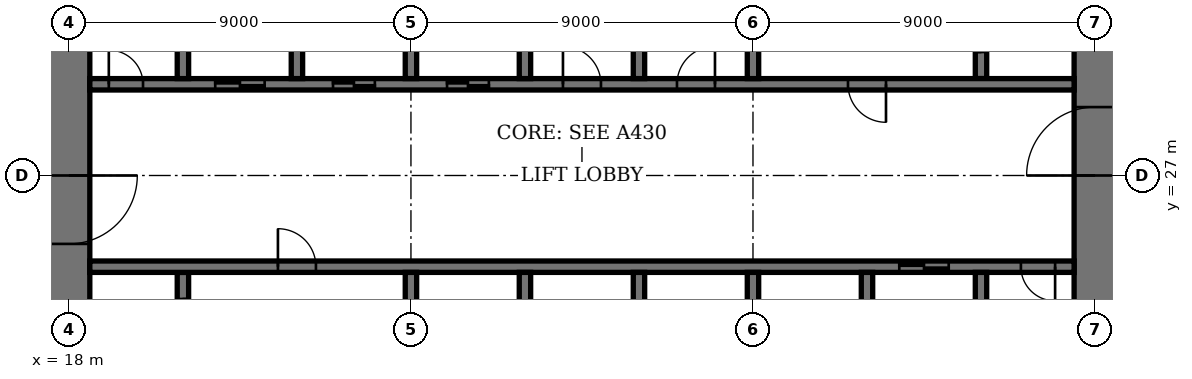
"""IFC4 building model, lengths in metres.
Left out: names, types, materials, properties, quantities, classifications, styles, units other than length and angle.
Written with IfcOpenShell. Run it as: python <this file> out.ifc"""

import sys

from ifc_helpers import new_model, si_unit, direction, frame, frame_2d, origin, place, context, subcontext, project, spatial, rectangle, extrude, element, fill, save


model = new_model("IFC4")
c1 = context("Model", 3, precision=1e-05, world=origin(), true_north=direction((0.0, 1.0)))
c2 = subcontext(c1, "Body", "Model", "MODEL_VIEW")
j1 = project(units=[si_unit("LENGTHUNIT", "METRE"), si_unit("PLANEANGLEUNIT", "RADIAN")], contexts=[c1])
p1 = place(None, origin())
s1 = spatial("IfcSite", under=j1, at=p1, CompositionType="ELEMENT")
p2 = place(p1, origin())
s2 = spatial("IfcBuilding", under=s1, at=p2, CompositionType="ELEMENT")
p3 = place(p2, frame((0.0, 0.0, 202.2)))
s3 = spatial("IfcBuildingStorey", under=s2, at=p3, CompositionType="ELEMENT", Elevation=202.2)
p4 = place(p3, frame((18.0, 35.45, 0.0), z_axis=(0.0, 0.0, 1.0), x_axis=(0.0, -1.0, 0.0)))
e1 = element("IfcWall", 1, at=p4, inside=s3, PredefinedType="SHEAR", context=c2, shape_type="SweptSolid", body=[
    extrude(rectangle(XDim=16.9, YDim=1.1, at=frame_2d((8.45, 0.0))), origin(), (0.0, 0.0, 1.0), 4.0),
])
p5 = place(p4, frame((8.45, 0.0, 0.0)))
e2 = element("IfcOpeningElement", 2, at=p5, cuts=e1, PredefinedType="OPENING", context=c2, shape_type="SweptSolid", body=[
    extrude(rectangle(XDim=1.8, YDim=2.4, at=frame_2d((0.9, 1.2))), frame((0.0, 0.56, 0.0), z_axis=(0.0, -1.0, 0.0), x_axis=(1.0, 0.0, 0.0)), (0.0, 0.0, 1.0), 1.12),
])
p6 = place(p3, frame((45.0, 18.55, 0.0), z_axis=(0.0, 0.0, 1.0), x_axis=(0.0, 1.0, 0.0)))
e3 = element("IfcWall", 3, at=p6, inside=s3, PredefinedType="SHEAR", context=c2, shape_type="SweptSolid", body=[
    extrude(rectangle(XDim=16.9, YDim=1.1, at=frame_2d((8.45, 0.0))), origin(), (0.0, 0.0, 1.0), 4.0),
])
p7 = place(p6, frame((8.45, 0.0, 0.0)))
e4 = element("IfcOpeningElement", 4, at=p7, cuts=e3, PredefinedType="OPENING", context=c2, shape_type="SweptSolid", body=[
    extrude(rectangle(XDim=1.8, YDim=2.4, at=frame_2d((0.9, 1.2))), frame((0.0, 0.56, 0.0), z_axis=(0.0, -1.0, 0.0), x_axis=(1.0, 0.0, 0.0)), (0.0, 0.0, 1.0), 1.12),
])
p8 = place(p3, frame((21.0, 21.95, 0.0), z_axis=(0.0, 0.0, 1.0), x_axis=(0.0, 1.0, 0.0)))
e5 = element("IfcWall", 5, at=p8, inside=s3, PredefinedType="SHEAR", context=c2, shape_type="SweptSolid", body=[
    extrude(rectangle(XDim=2.5, YDim=0.3, at=frame_2d((1.25, 0.0))), origin(), (0.0, 0.0, 1.0), 4.0),
])
p9 = place(p8, frame((0.7, 0.0, 0.0)))
e6 = element("IfcOpeningElement", 6, at=p9, cuts=e5, PredefinedType="OPENING", context=c2, shape_type="SweptSolid", body=[
    extrude(rectangle(XDim=1.1, YDim=2.4, at=frame_2d((0.55, 1.2))), frame((0.0, 0.16, 0.0), z_axis=(0.0, -1.0, 0.0), x_axis=(1.0, 0.0, 0.0)), (0.0, 0.0, 1.0), 0.32),
])
p10 = place(p3, frame((42.0, 29.55, 0.0), z_axis=(0.0, 0.0, 1.0), x_axis=(0.0, 1.0, 0.0)))
e7 = element("IfcWall", 7, at=p10, inside=s3, PredefinedType="SHEAR", context=c2, shape_type="SweptSolid", body=[
    extrude(rectangle(XDim=2.5, YDim=0.3, at=frame_2d((1.25, 0.0))), origin(), (0.0, 0.0, 1.0), 4.0),
])
p11 = place(p10, frame((0.7, 0.0, 0.0)))
e8 = element("IfcOpeningElement", 8, at=p11, cuts=e7, PredefinedType="OPENING", context=c2, shape_type="SweptSolid", body=[
    extrude(rectangle(XDim=1.1, YDim=2.4, at=frame_2d((0.55, 1.2))), frame((0.0, 0.16, 0.0), z_axis=(0.0, -1.0, 0.0), x_axis=(1.0, 0.0, 0.0)), (0.0, 0.0, 1.0), 0.32),
])
p12 = place(p3, frame((18.55, 24.6, 0.0), z_axis=(0.0, 0.0, 1.0), x_axis=(1.0, 0.0, 0.0)))
e9 = element("IfcWall", 9, at=p12, inside=s3, PredefinedType="SHEAR", context=c2, shape_type="SweptSolid", body=[
    extrude(rectangle(XDim=25.9, YDim=0.3, at=frame_2d((12.95, 0.0))), origin(), (0.0, 0.0, 1.0), 4.0),
])
p13 = place(p12, frame((4.95, 0.0, 0.0)))
e10 = element("IfcOpeningElement", 10, at=p13, cuts=e9, PredefinedType="OPENING", context=c2, shape_type="SweptSolid", body=[
    extrude(rectangle(XDim=1.0, YDim=2.4, at=frame_2d((0.5, 1.2))), frame((0.0, 0.16, 0.0), z_axis=(0.0, -1.0, 0.0), x_axis=(1.0, 0.0, 0.0)), (0.0, 0.0, 1.0), 0.32),
])
p14 = place(p12, frame((24.5, 0.0, 0.0)))
e11 = element("IfcOpeningElement", 11, at=p14, cuts=e9, PredefinedType="OPENING", context=c2, shape_type="SweptSolid", body=[
    extrude(rectangle(XDim=0.9, YDim=2.1, at=frame_2d((0.45, 1.05))), frame((0.0, 0.16, 0.0), z_axis=(0.0, -1.0, 0.0), x_axis=(1.0, 0.0, 0.0)), (0.0, 0.0, 1.0), 0.32),
])
p15 = place(p12, frame((21.3, 0.0, 0.0)))
e12 = element("IfcOpeningElement", 12, at=p15, cuts=e9, PredefinedType="OPENING", context=c2, shape_type="SweptSolid", body=[
    extrude(rectangle(XDim=1.3, YDim=2.4, at=frame_2d((0.65, 1.2))), frame((0.0, 0.16, 0.0), z_axis=(0.0, -1.0, 0.0), x_axis=(1.0, 0.0, 0.0)), (0.0, 0.0, 1.0), 0.32),
])
p16 = place(p3, frame((18.55, 29.4, 0.0), z_axis=(0.0, 0.0, 1.0), x_axis=(1.0, 0.0, 0.0)))
e13 = element("IfcWall", 13, at=p16, inside=s3, PredefinedType="SHEAR", context=c2, shape_type="SweptSolid", body=[
    extrude(rectangle(XDim=25.9, YDim=0.3, at=frame_2d((12.95, 0.0))), origin(), (0.0, 0.0, 1.0), 4.0),
])
p17 = place(p16, frame((19.95, 0.0, 0.0)))
e14 = element("IfcOpeningElement", 14, at=p17, cuts=e13, PredefinedType="OPENING", context=c2, shape_type="SweptSolid", body=[
    extrude(rectangle(XDim=1.0, YDim=2.4, at=frame_2d((0.5, 1.2))), frame((0.0, 0.16, 0.0), z_axis=(0.0, -1.0, 0.0), x_axis=(1.0, 0.0, 0.0)), (0.0, 0.0, 1.0), 0.32),
])
p18 = place(p16, frame((0.5, 0.0, 0.0)))
e15 = element("IfcOpeningElement", 15, at=p18, cuts=e13, PredefinedType="OPENING", context=c2, shape_type="SweptSolid", body=[
    extrude(rectangle(XDim=0.9, YDim=2.1, at=frame_2d((0.45, 1.05))), frame((0.0, 0.16, 0.0), z_axis=(0.0, -1.0, 0.0), x_axis=(1.0, 0.0, 0.0)), (0.0, 0.0, 1.0), 0.32),
])
p19 = place(p16, frame((15.45, 0.0, 0.0)))
e16 = element("IfcOpeningElement", 16, at=p19, cuts=e13, PredefinedType="OPENING", context=c2, shape_type="SweptSolid", body=[
    extrude(rectangle(XDim=1.0, YDim=2.4, at=frame_2d((0.5, 1.2))), frame((0.0, 0.16, 0.0), z_axis=(0.0, -1.0, 0.0), x_axis=(1.0, 0.0, 0.0)), (0.0, 0.0, 1.0), 0.32),
])
p20 = place(p16, frame((12.45, 0.0, 0.0)))
e17 = element("IfcOpeningElement", 17, at=p20, cuts=e13, PredefinedType="OPENING", context=c2, shape_type="SweptSolid", body=[
    extrude(rectangle(XDim=1.0, YDim=2.4, at=frame_2d((0.5, 1.2))), frame((0.0, 0.16, 0.0), z_axis=(0.0, -1.0, 0.0), x_axis=(1.0, 0.0, 0.0)), (0.0, 0.0, 1.0), 0.32),
])
p21 = place(p16, frame((9.4, 0.0, 0.0)))
e18 = element("IfcOpeningElement", 18, at=p21, cuts=e13, PredefinedType="OPENING", context=c2, shape_type="SweptSolid", body=[
    extrude(rectangle(XDim=1.1, YDim=2.4, at=frame_2d((0.55, 1.2))), frame((0.0, 0.16, 0.0), z_axis=(0.0, -1.0, 0.0), x_axis=(1.0, 0.0, 0.0)), (0.0, 0.0, 1.0), 0.32),
])
p22 = place(p16, frame((6.4, 0.0, 0.0)))
e19 = element("IfcOpeningElement", 19, at=p22, cuts=e13, PredefinedType="OPENING", context=c2, shape_type="SweptSolid", body=[
    extrude(rectangle(XDim=1.1, YDim=2.4, at=frame_2d((0.55, 1.2))), frame((0.0, 0.16, 0.0), z_axis=(0.0, -1.0, 0.0), x_axis=(1.0, 0.0, 0.0)), (0.0, 0.0, 1.0), 0.32),
])
p23 = place(p16, frame((3.3, 0.0, 0.0)))
e20 = element("IfcOpeningElement", 20, at=p23, cuts=e13, PredefinedType="OPENING", context=c2, shape_type="SweptSolid", body=[
    extrude(rectangle(XDim=1.3, YDim=2.4, at=frame_2d((0.65, 1.2))), frame((0.0, 0.16, 0.0), z_axis=(0.0, -1.0, 0.0), x_axis=(1.0, 0.0, 0.0)), (0.0, 0.0, 1.0), 0.32),
])
for number, where, z_axis, x_axis in (
    (21, (30.0, 21.75, 0.0), (0.0, 0.0, 1.0), (0.0, 1.0, 0.0)),
    (22, (33.0, 29.55, 0.0), (0.0, 0.0, 1.0), (0.0, 1.0, 0.0)),
    (23, (33.0, 21.75, 0.0), (0.0, 0.0, 1.0), (0.0, 1.0, 0.0)),
    (24, (30.0, 29.55, 0.0), (0.0, 0.0, 1.0), (0.0, 1.0, 0.0)),
    (25, (36.0, 21.75, 0.0), (0.0, 0.0, 1.0), (0.0, 1.0, 0.0)),
    (26, (27.0, 29.55, 0.0), (0.0, 0.0, 1.0), (0.0, 1.0, 0.0)),
):
    element("IfcWall", number, at=place(p3, frame(where, z_axis=z_axis, x_axis=x_axis)), inside=s3, PredefinedType="SHEAR", context=c2, shape_type="SweptSolid", body=[
        extrude(rectangle(XDim=2.7, YDim=0.3, at=frame_2d((1.35, 0.0))), origin(), (0.0, 0.0, 1.0), 4.0),
    ])
for number, where, z_axis, x_axis in (
    (27, (39.0, 18.55, 0.0), (0.0, 0.0, 1.0), (0.0, 1.0, 0.0)),
    (28, (24.0, 29.55, 0.0), (0.0, 0.0, 1.0), (0.0, 1.0, 0.0)),
):
    element("IfcWall", number, at=place(p3, frame(where, z_axis=z_axis, x_axis=x_axis)), inside=s3, PredefinedType="SHEAR", context=c2, shape_type="SweptSolid", body=[
        extrude(rectangle(XDim=5.9, YDim=0.3, at=frame_2d((2.95, 0.0))), origin(), (0.0, 0.0, 1.0), 4.0),
    ])
for number, where, z_axis, x_axis in (
    (29, (42.0, 21.75, 0.0), (0.0, 0.0, 1.0), (0.0, 1.0, 0.0)),
    (30, (21.0, 29.55, 0.0), (0.0, 0.0, 1.0), (0.0, 1.0, 0.0)),
):
    element("IfcWall", number, at=place(p3, frame(where, z_axis=z_axis, x_axis=x_axis)), inside=s3, PredefinedType="SHEAR", context=c2, shape_type="SweptSolid", body=[
        extrude(rectangle(XDim=2.7, YDim=0.3, at=frame_2d((1.35, 0.0))), origin(), (0.0, 0.0, 1.0), 4.0),
    ])
for number, where, z_axis, x_axis in (
    (31, (27.0, 21.6, 0.0), (0.0, 0.0, 1.0), (0.0, 1.0, 0.0)),
    (32, (36.0, 29.55, 0.0), (0.0, 0.0, 1.0), (0.0, 1.0, 0.0)),
):
    element("IfcWall", number, at=place(p3, frame(where, z_axis=z_axis, x_axis=x_axis)), inside=s3, PredefinedType="SHEAR", context=c2, shape_type="SweptSolid", body=[
        extrude(rectangle(XDim=2.85, YDim=0.3, at=frame_2d((1.425, 0.0))), origin(), (0.0, 0.0, 1.0), 4.0),
    ])
p24 = place(p5, origin())
e33 = element("IfcDoor", 33, at=p24, inside=s3, OperationType="DOUBLE_DOOR_DOUBLE_SWING", PredefinedType="DOOR", context=c2, shape_type="SweptSolid", body=[
    extrude(rectangle(XDim=1.8, YDim=2.4, at=frame_2d((0.9, 1.2))), frame((0.0, 0.03, 0.0), z_axis=(0.0, -1.0, 0.0), x_axis=(1.0, 0.0, 0.0)), (0.0, 0.0, 1.0), 0.06),
    extrude(rectangle(XDim=0.04, YDim=2.4, at=frame_2d((0.02, 1.2))), frame((0.0, 0.55, 0.0), z_axis=(0.0, -1.0, 0.0), x_axis=(1.0, 0.0, 0.0)), (0.0, 0.0, 1.0), 1.1),
    extrude(rectangle(XDim=0.04, YDim=2.4, at=frame_2d((1.78, 1.2))), frame((0.0, 0.55, 0.0), z_axis=(0.0, -1.0, 0.0), x_axis=(1.0, 0.0, 0.0)), (0.0, 0.0, 1.0), 1.1),
    extrude(rectangle(XDim=1.8, YDim=0.04, at=frame_2d((0.9, 2.38))), frame((0.0, 0.55, 0.0), z_axis=(0.0, -1.0, 0.0), x_axis=(1.0, 0.0, 0.0)), (0.0, 0.0, 1.0), 1.1),
])
fill(e2, e33)
p25 = place(p7, origin())
e34 = element("IfcDoor", 34, at=p25, inside=s3, OperationType="DOUBLE_DOOR_DOUBLE_SWING", PredefinedType="DOOR", context=c2, shape_type="SweptSolid", body=[
    extrude(rectangle(XDim=1.8, YDim=2.4, at=frame_2d((0.9, 1.2))), frame((0.0, 0.03, 0.0), z_axis=(0.0, -1.0, 0.0), x_axis=(1.0, 0.0, 0.0)), (0.0, 0.0, 1.0), 0.06),
    extrude(rectangle(XDim=0.04, YDim=2.4, at=frame_2d((0.02, 1.2))), frame((0.0, 0.55, 0.0), z_axis=(0.0, -1.0, 0.0), x_axis=(1.0, 0.0, 0.0)), (0.0, 0.0, 1.0), 1.1),
    extrude(rectangle(XDim=0.04, YDim=2.4, at=frame_2d((1.78, 1.2))), frame((0.0, 0.55, 0.0), z_axis=(0.0, -1.0, 0.0), x_axis=(1.0, 0.0, 0.0)), (0.0, 0.0, 1.0), 1.1),
    extrude(rectangle(XDim=1.8, YDim=0.04, at=frame_2d((0.9, 2.38))), frame((0.0, 0.55, 0.0), z_axis=(0.0, -1.0, 0.0), x_axis=(1.0, 0.0, 0.0)), (0.0, 0.0, 1.0), 1.1),
])
fill(e4, e34)
p26 = place(p13, origin())
e35 = element("IfcDoor", 35, at=p26, inside=s3, OperationType="SINGLE_SWING_RIGHT", PredefinedType="DOOR", context=c2, shape_type="SweptSolid", body=[
    extrude(rectangle(XDim=1.0, YDim=2.4, at=frame_2d((0.5, 1.2))), frame((0.0, 0.03, 0.0), z_axis=(0.0, -1.0, 0.0), x_axis=(1.0, 0.0, 0.0)), (0.0, 0.0, 1.0), 0.06),
])
fill(e10, e35)
p27 = place(p17, origin())
e36 = element("IfcDoor", 36, at=p27, inside=s3, OperationType="SINGLE_SWING_RIGHT", PredefinedType="DOOR", context=c2, shape_type="SweptSolid", body=[
    extrude(rectangle(XDim=1.0, YDim=2.4, at=frame_2d((0.5, 1.2))), frame((0.0, 0.03, 0.0), z_axis=(0.0, -1.0, 0.0), x_axis=(1.0, 0.0, 0.0)), (0.0, 0.0, 1.0), 0.06),
])
fill(e14, e36)
p28 = place(p14, origin())
e37 = element("IfcDoor", 37, at=p28, inside=s3, OperationType="SINGLE_SWING_RIGHT", PredefinedType="DOOR", context=c2, shape_type="SweptSolid", body=[
    extrude(rectangle(XDim=0.9, YDim=2.1, at=frame_2d((0.45, 1.05))), frame((0.0, 0.03, 0.0), z_axis=(0.0, -1.0, 0.0), x_axis=(1.0, 0.0, 0.0)), (0.0, 0.0, 1.0), 0.06),
])
fill(e11, e37)
p29 = place(p18, origin())
e38 = element("IfcDoor", 38, at=p29, inside=s3, OperationType="SINGLE_SWING_RIGHT", PredefinedType="DOOR", context=c2, shape_type="SweptSolid", body=[
    extrude(rectangle(XDim=0.9, YDim=2.1, at=frame_2d((0.45, 1.05))), frame((0.0, 0.03, 0.0), z_axis=(0.0, -1.0, 0.0), x_axis=(1.0, 0.0, 0.0)), (0.0, 0.0, 1.0), 0.06),
])
fill(e15, e38)
p30 = place(p19, origin())
e39 = element("IfcDoor", 39, at=p30, inside=s3, OperationType="SINGLE_SWING_LEFT", PredefinedType="DOOR", context=c2, shape_type="SweptSolid", body=[
    extrude(rectangle(XDim=1.0, YDim=2.4, at=frame_2d((0.5, 1.2))), frame((0.0, 0.03, 0.0), z_axis=(0.0, -1.0, 0.0), x_axis=(1.0, 0.0, 0.0)), (0.0, 0.0, 1.0), 0.06),
])
fill(e16, e39)
p31 = place(p20, origin())
e40 = element("IfcDoor", 40, at=p31, inside=s3, OperationType="SINGLE_SWING_RIGHT", PredefinedType="DOOR", context=c2, shape_type="SweptSolid", body=[
    extrude(rectangle(XDim=1.0, YDim=2.4, at=frame_2d((0.5, 1.2))), frame((0.0, 0.03, 0.0), z_axis=(0.0, -1.0, 0.0), x_axis=(1.0, 0.0, 0.0)), (0.0, 0.0, 1.0), 0.06),
])
fill(e17, e40)
p32 = place(p21, origin())
e41 = element("IfcDoor", 41, at=p32, inside=s3, OperationType="DOUBLE_DOOR_SLIDING", PredefinedType="DOOR", context=c2, shape_type="SweptSolid", body=[
    extrude(rectangle(XDim=1.1, YDim=2.4, at=frame_2d((0.55, 1.2))), frame((0.0, 0.02, 0.0), z_axis=(0.0, -1.0, 0.0), x_axis=(1.0, 0.0, 0.0)), (0.0, 0.0, 1.0), 0.04),
])
fill(e18, e41)
p33 = place(p22, origin())
e42 = element("IfcDoor", 42, at=p33, inside=s3, OperationType="DOUBLE_DOOR_SLIDING", PredefinedType="DOOR", context=c2, shape_type="SweptSolid", body=[
    extrude(rectangle(XDim=1.1, YDim=2.4, at=frame_2d((0.55, 1.2))), frame((0.0, 0.02, 0.0), z_axis=(0.0, -1.0, 0.0), x_axis=(1.0, 0.0, 0.0)), (0.0, 0.0, 1.0), 0.04),
])
fill(e19, e42)
p34 = place(p15, origin())
e43 = element("IfcDoor", 43, at=p34, inside=s3, OperationType="DOUBLE_DOOR_SLIDING", PredefinedType="DOOR", context=c2, shape_type="SweptSolid", body=[
    extrude(rectangle(XDim=1.3, YDim=2.4, at=frame_2d((0.65, 1.2))), frame((0.0, 0.02, 0.0), z_axis=(0.0, -1.0, 0.0), x_axis=(1.0, 0.0, 0.0)), (0.0, 0.0, 1.0), 0.04),
])
fill(e12, e43)
p35 = place(p23, origin())
e44 = element("IfcDoor", 44, at=p35, inside=s3, OperationType="DOUBLE_DOOR_SLIDING", PredefinedType="DOOR", context=c2, shape_type="SweptSolid", body=[
    extrude(rectangle(XDim=1.3, YDim=2.4, at=frame_2d((0.65, 1.2))), frame((0.0, 0.02, 0.0), z_axis=(0.0, -1.0, 0.0), x_axis=(1.0, 0.0, 0.0)), (0.0, 0.0, 1.0), 0.04),
])
fill(e20, e44)
save(model, sys.argv[1])
